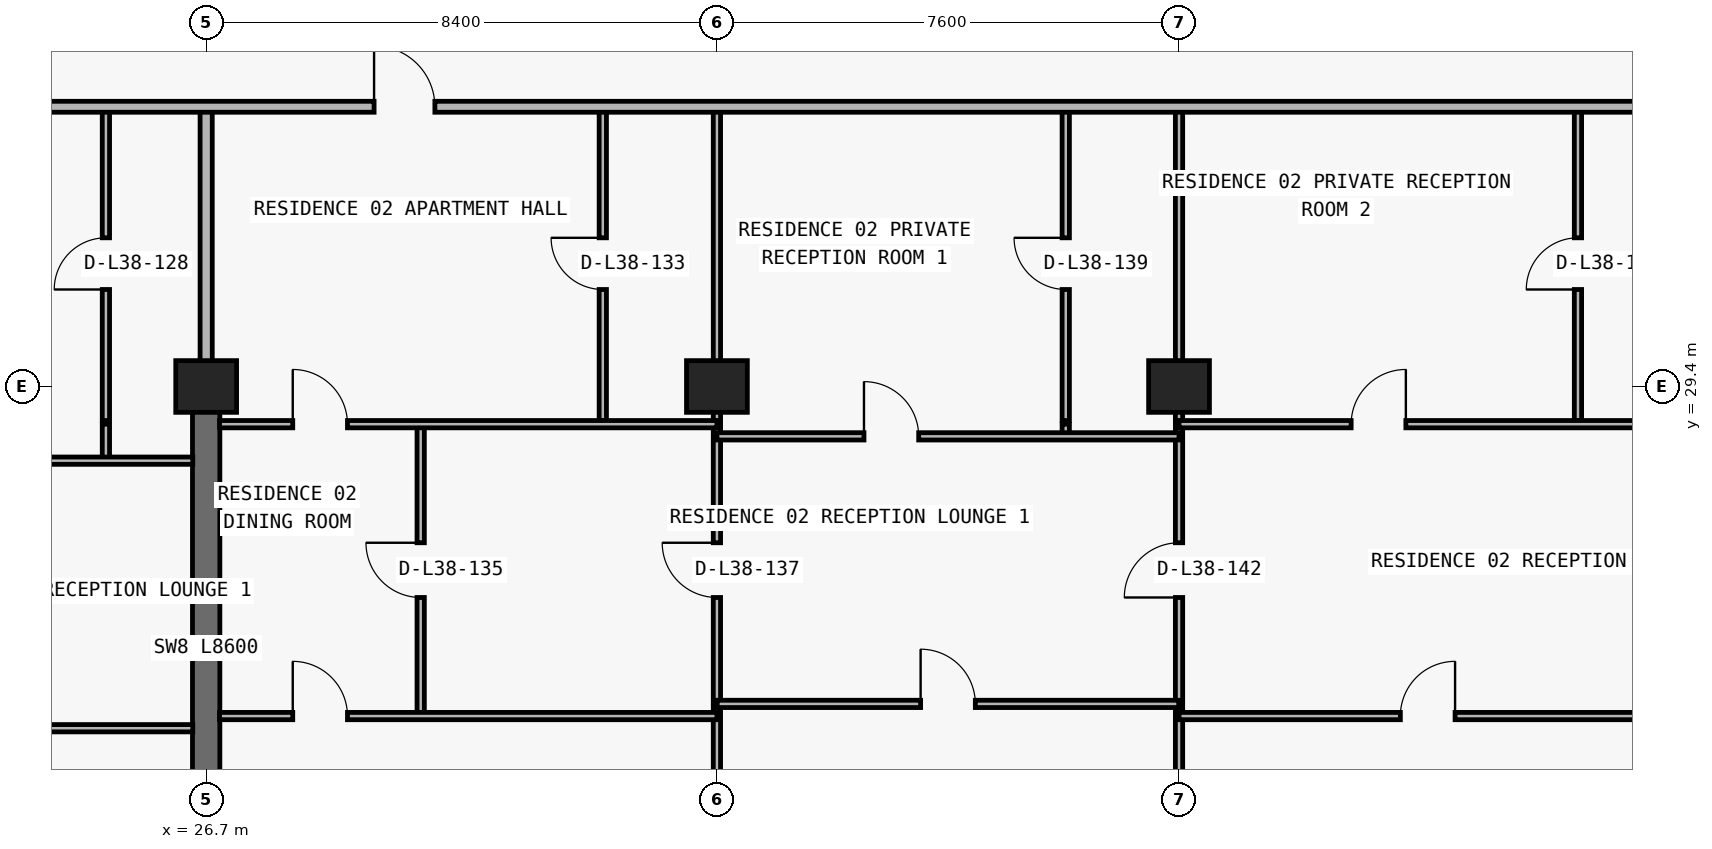
"""IFC4 building model, lengths in metres.
Left out: names, types, materials, properties, quantities, classifications, styles, units other than length and angle.
Written with IfcOpenShell. Run it as: python <this file> out.ifc"""

import sys

from ifc_helpers import new_model, si_unit, direction, frame, frame_2d, origin, origin_2d, place, context, subcontext, project, spatial, rectangle, extrude, element, fill, save


model = new_model("IFC4")
c1 = context("Model", 3, precision=1e-05, world=origin(), true_north=direction((0.0, 1.0)))
c2 = subcontext(c1, "Body", "Model", "MODEL_VIEW")
j1 = project(units=[si_unit("LENGTHUNIT", "METRE"), si_unit("PLANEANGLEUNIT", "RADIAN")], contexts=[c1])
p1 = place(None, origin())
s1 = spatial("IfcSite", under=j1, at=p1, CompositionType="ELEMENT")
p2 = place(p1, origin())
s2 = spatial("IfcBuilding", under=s1, at=p2, CompositionType="ELEMENT")
p3 = place(p2, frame((0.0, 0.0, 138.9)))
s3 = spatial("IfcBuildingStorey", under=s2, at=p3, CompositionType="ELEMENT", Elevation=138.9)
for number, where, z_axis, x_axis in (
    (1, (26.7, 29.4, 0.0), (0.0, 0.0, 1.0), (1.0, 0.0, 0.0)),
    (2, (35.1, 29.4, 0.0), (0.0, 0.0, 1.0), (1.0, 0.0, 0.0)),
    (3, (42.7, 29.4, 0.0), (0.0, 0.0, 1.0), (1.0, 0.0, 0.0)),
):
    element("IfcColumn", number, at=place(p3, frame(where, z_axis=z_axis, x_axis=x_axis)), inside=s3, PredefinedType="COLUMN", context=c2, shape_type="SweptSolid", body=[
        extrude(rectangle(XDim=1.0, YDim=0.85, at=origin_2d()), origin(), (0.0, 0.0, 1.0), 3.05),
    ])
p4 = place(p3, frame((26.7, 20.8, 0.0), z_axis=(0.0, 0.0, 1.0), x_axis=(0.0, 1.0, 0.0)))
e4 = element("IfcWall", 4, at=p4, inside=s3, PredefinedType="SHEAR", context=c2, shape_type="SweptSolid", body=[
    extrude(rectangle(XDim=8.6, YDim=0.45, at=frame_2d((4.3, 0.0))), origin(), (0.0, 0.0, 1.0), 3.05),
])
p5 = place(p3, frame((25.051, 28.18, 0.0), z_axis=(0.0, 0.0, 1.0), x_axis=(0.0, 1.0, 0.0)))
e5 = element("IfcWall", 5, at=p5, inside=s3, PredefinedType="PARTITIONING", context=c2, shape_type="SweptSolid", body=[
    extrude(rectangle(XDim=0.6, YDim=0.12, at=frame_2d((0.3, 0.0))), origin(), (0.0, 0.0, 1.0), 3.05),
])
p6 = place(p3, frame((25.051, 28.84, 0.0), z_axis=(0.0, 0.0, 1.0), x_axis=(0.0, 1.0, 0.0)))
e6 = element("IfcWall", 6, at=p6, inside=s3, PredefinedType="PARTITIONING", context=c2, shape_type="SweptSolid", body=[
    extrude(rectangle(XDim=5.16, YDim=0.12, at=frame_2d((2.58, 0.0))), origin(), (0.0, 0.0, 1.0), 3.05),
])
p7 = place(p6, frame((2.155, 0.0, 0.0)))
e7 = element("IfcOpeningElement", 7, at=p7, cuts=e6, PredefinedType="OPENING", context=c2, shape_type="SweptSolid", body=[
    extrude(rectangle(XDim=0.85, YDim=2.1, at=frame_2d((0.425, 1.05))), frame((0.0, 0.07, 0.0), z_axis=(0.0, -1.0, 0.0), x_axis=(1.0, 0.0, 0.0)), (0.0, 0.0, 1.0), 0.14),
])
p8 = place(p3, frame((26.7, 29.405, 0.0), z_axis=(0.0, 0.0, 1.0), x_axis=(0.0, 1.0, 0.0)))
e8 = element("IfcWall", 8, at=p8, inside=s3, PredefinedType="PARTITIONING", context=c2, shape_type="SweptSolid", body=[
    extrude(rectangle(XDim=4.595, YDim=0.2, at=frame_2d((2.297, 0.0))), origin(), (0.0, 0.0, 1.0), 2.335),
])
p9 = place(p3, frame((30.228, 23.98, 0.0), z_axis=(0.0, 0.0, 1.0), x_axis=(0.0, 1.0, 0.0)))
e9 = element("IfcWall", 9, at=p9, inside=s3, PredefinedType="PARTITIONING", context=c2, shape_type="SweptSolid", body=[
    extrude(rectangle(XDim=4.8, YDim=0.12, at=frame_2d((2.4, 0.0))), origin(), (0.0, 0.0, 1.0), 3.05),
])
p10 = place(p9, frame((1.95, 0.0, 0.0)))
e10 = element("IfcOpeningElement", 10, at=p10, cuts=e9, PredefinedType="OPENING", context=c2, shape_type="SweptSolid", body=[
    extrude(rectangle(XDim=0.9, YDim=2.15, at=frame_2d((0.45, 1.075))), frame((0.0, 0.07, 0.0), z_axis=(0.0, -1.0, 0.0), x_axis=(1.0, 0.0, 0.0)), (0.0, 0.0, 1.0), 0.14),
])
p11 = place(p3, frame((33.223, 28.84, 0.0), z_axis=(0.0, 0.0, 1.0), x_axis=(0.0, 1.0, 0.0)))
e11 = element("IfcWall", 11, at=p11, inside=s3, PredefinedType="PARTITIONING", context=c2, shape_type="SweptSolid", body=[
    extrude(rectangle(XDim=5.16, YDim=0.12, at=frame_2d((2.58, 0.0))), origin(), (0.0, 0.0, 1.0), 3.05),
])
p12 = place(p11, frame((2.155, 0.0, 0.0)))
e12 = element("IfcOpeningElement", 12, at=p12, cuts=e11, PredefinedType="OPENING", context=c2, shape_type="SweptSolid", body=[
    extrude(rectangle(XDim=0.85, YDim=2.1, at=frame_2d((0.425, 1.05))), frame((0.0, 0.07, 0.0), z_axis=(0.0, -1.0, 0.0), x_axis=(1.0, 0.0, 0.0)), (0.0, 0.0, 1.0), 0.14),
])
p13 = place(p3, frame((35.1, 8.84, 0.0), z_axis=(0.0, 0.0, 1.0), x_axis=(0.0, 1.0, 0.0)))
e13 = element("IfcWall", 13, at=p13, inside=s3, PredefinedType="PARTITIONING", context=c2, shape_type="SweptSolid", body=[
    extrude(rectangle(XDim=19.94, YDim=0.12, at=frame_2d((9.97, 0.0))), origin(), (0.0, 0.0, 1.0), 2.174),
])
p14 = place(p13, frame((17.09, 0.0, 0.0)))
e14 = element("IfcOpeningElement", 14, at=p14, cuts=e13, PredefinedType="OPENING", context=c2, shape_type="SweptSolid", body=[
    extrude(rectangle(XDim=0.9, YDim=2.124, at=frame_2d((0.45, 1.062))), frame((0.0, 0.07, 0.0), z_axis=(0.0, -1.0, 0.0), x_axis=(1.0, 0.0, 0.0)), (0.0, 0.0, 1.0), 0.14),
])
p15 = place(p3, frame((35.1, 28.84, 0.0), z_axis=(0.0, 0.0, 1.0), x_axis=(0.0, 1.0, 0.0)))
e15 = element("IfcWall", 15, at=p15, inside=s3, PredefinedType="PARTITIONING", context=c2, shape_type="SweptSolid", body=[
    extrude(rectangle(XDim=5.16, YDim=0.12, at=frame_2d((2.58, 0.0))), origin(), (0.0, 0.0, 1.0), 2.174),
])
p16 = place(p3, frame((40.837, 28.58, 0.0), z_axis=(0.0, 0.0, 1.0), x_axis=(0.0, 1.0, 0.0)))
e16 = element("IfcWall", 16, at=p16, inside=s3, PredefinedType="PARTITIONING", context=c2, shape_type="SweptSolid", body=[
    extrude(rectangle(XDim=0.2, YDim=0.12, at=frame_2d((0.1, 0.0))), origin(), (0.0, 0.0, 1.0), 3.05),
])
p17 = place(p3, frame((40.837, 28.84, 0.0), z_axis=(0.0, 0.0, 1.0), x_axis=(0.0, 1.0, 0.0)))
e17 = element("IfcWall", 17, at=p17, inside=s3, PredefinedType="PARTITIONING", context=c2, shape_type="SweptSolid", body=[
    extrude(rectangle(XDim=5.16, YDim=0.12, at=frame_2d((2.58, 0.0))), origin(), (0.0, 0.0, 1.0), 3.05),
])
p18 = place(p17, frame((2.155, 0.0, 0.0)))
e18 = element("IfcOpeningElement", 18, at=p18, cuts=e17, PredefinedType="OPENING", context=c2, shape_type="SweptSolid", body=[
    extrude(rectangle(XDim=0.85, YDim=2.1, at=frame_2d((0.425, 1.05))), frame((0.0, 0.07, 0.0), z_axis=(0.0, -1.0, 0.0), x_axis=(1.0, 0.0, 0.0)), (0.0, 0.0, 1.0), 0.14),
])
p19 = place(p3, frame((42.7, 8.84, 0.0), z_axis=(0.0, 0.0, 1.0), x_axis=(0.0, 1.0, 0.0)))
e19 = element("IfcWall", 19, at=p19, inside=s3, PredefinedType="PARTITIONING", context=c2, shape_type="SweptSolid", body=[
    extrude(rectangle(XDim=19.94, YDim=0.12, at=frame_2d((9.97, 0.0))), origin(), (0.0, 0.0, 1.0), 2.174),
])
p20 = place(p19, frame((17.09, 0.0, 0.0)))
e20 = element("IfcOpeningElement", 20, at=p20, cuts=e19, PredefinedType="OPENING", context=c2, shape_type="SweptSolid", body=[
    extrude(rectangle(XDim=0.9, YDim=2.124, at=frame_2d((0.45, 1.062))), frame((0.0, 0.07, 0.0), z_axis=(0.0, -1.0, 0.0), x_axis=(1.0, 0.0, 0.0)), (0.0, 0.0, 1.0), 0.14),
])
p21 = place(p3, frame((42.7, 28.84, 0.0), z_axis=(0.0, 0.0, 1.0), x_axis=(0.0, 1.0, 0.0)))
e21 = element("IfcWall", 21, at=p21, inside=s3, PredefinedType="PARTITIONING", context=c2, shape_type="SweptSolid", body=[
    extrude(rectangle(XDim=5.16, YDim=0.12, at=frame_2d((2.58, 0.0))), origin(), (0.0, 0.0, 1.0), 2.174),
])
p22 = place(p3, frame((49.261, 28.84, 0.0), z_axis=(0.0, 0.0, 1.0), x_axis=(0.0, 1.0, 0.0)))
e22 = element("IfcWall", 22, at=p22, inside=s3, PredefinedType="PARTITIONING", context=c2, shape_type="SweptSolid", body=[
    extrude(rectangle(XDim=5.16, YDim=0.12, at=frame_2d((2.58, 0.0))), origin(), (0.0, 0.0, 1.0), 3.05),
])
p23 = place(p22, frame((2.155, 0.0, 0.0)))
e23 = element("IfcOpeningElement", 23, at=p23, cuts=e22, PredefinedType="OPENING", context=c2, shape_type="SweptSolid", body=[
    extrude(rectangle(XDim=0.85, YDim=2.1, at=frame_2d((0.425, 1.05))), frame((0.0, 0.07, 0.0), z_axis=(0.0, -1.0, 0.0), x_axis=(1.0, 0.0, 0.0)), (0.0, 0.0, 1.0), 0.14),
])
p24 = place(p3, frame((18.3, 23.78, 0.0), z_axis=(0.0, 0.0, 1.0), x_axis=(1.0, 0.0, 0.0)))
e24 = element("IfcWall", 24, at=p24, inside=s3, PredefinedType="PARTITIONING", context=c2, shape_type="SweptSolid", body=[
    extrude(rectangle(XDim=8.18, YDim=0.12, at=frame_2d((4.09, 0.0))), origin(), (0.0, 0.0, 1.0), 3.05),
])
p25 = place(p24, frame((3.64, 0.0, 0.0)))
e25 = element("IfcOpeningElement", 25, at=p25, cuts=e24, PredefinedType="OPENING", context=c2, shape_type="SweptSolid", body=[
    extrude(rectangle(XDim=0.9, YDim=2.15, at=frame_2d((0.45, 1.075))), frame((0.0, 0.07, 0.0), z_axis=(0.0, -1.0, 0.0), x_axis=(1.0, 0.0, 0.0)), (0.0, 0.0, 1.0), 0.14),
])
p26 = place(p3, frame((26.92, 23.98, 0.0), z_axis=(0.0, 0.0, 1.0), x_axis=(1.0, 0.0, 0.0)))
e26 = element("IfcWall", 26, at=p26, inside=s3, PredefinedType="PARTITIONING", context=c2, shape_type="SweptSolid", body=[
    extrude(rectangle(XDim=8.18, YDim=0.12, at=frame_2d((4.09, 0.0))), origin(), (0.0, 0.0, 1.0), 3.05),
])
p27 = place(p26, frame((1.204, 0.0, 0.0)))
e27 = element("IfcOpeningElement", 27, at=p27, cuts=e26, PredefinedType="OPENING", context=c2, shape_type="SweptSolid", body=[
    extrude(rectangle(XDim=0.9, YDim=2.15, at=frame_2d((0.45, 1.075))), frame((0.0, 0.07, 0.0), z_axis=(0.0, -1.0, 0.0), x_axis=(1.0, 0.0, 0.0)), (0.0, 0.0, 1.0), 0.14),
])
p28 = place(p3, frame((42.7, 23.98, 0.0), z_axis=(0.0, 0.0, 1.0), x_axis=(1.0, 0.0, 0.0)))
e28 = element("IfcWall", 28, at=p28, inside=s3, PredefinedType="PARTITIONING", context=c2, shape_type="SweptSolid", body=[
    extrude(rectangle(XDim=8.18, YDim=0.12, at=frame_2d((4.09, 0.0))), origin(), (0.0, 0.0, 1.0), 3.05),
])
p29 = place(p28, frame((3.64, 0.0, 0.0)))
e29 = element("IfcOpeningElement", 29, at=p29, cuts=e28, PredefinedType="OPENING", context=c2, shape_type="SweptSolid", body=[
    extrude(rectangle(XDim=0.9, YDim=2.15, at=frame_2d((0.45, 1.075))), frame((0.0, 0.07, 0.0), z_axis=(0.0, -1.0, 0.0), x_axis=(1.0, 0.0, 0.0)), (0.0, 0.0, 1.0), 0.14),
])
p30 = place(p3, frame((35.105, 24.18, 0.0), z_axis=(0.0, 0.0, 1.0), x_axis=(1.0, 0.0, 0.0)))
e30 = element("IfcWall", 30, at=p30, inside=s3, PredefinedType="PARTITIONING", context=c2, shape_type="SweptSolid", body=[
    extrude(rectangle(XDim=7.59, YDim=0.12, at=frame_2d((3.795, 0.0))), origin(), (0.0, 0.0, 1.0), 3.05),
])
p31 = place(p30, frame((3.345, 0.0, 0.0)))
e31 = element("IfcOpeningElement", 31, at=p31, cuts=e30, PredefinedType="OPENING", context=c2, shape_type="SweptSolid", body=[
    extrude(rectangle(XDim=0.9, YDim=2.15, at=frame_2d((0.45, 1.075))), frame((0.0, 0.07, 0.0), z_axis=(0.0, -1.0, 0.0), x_axis=(1.0, 0.0, 0.0)), (0.0, 0.0, 1.0), 0.14),
])
p32 = place(p3, frame((18.3, 28.18, 0.0), z_axis=(0.0, 0.0, 1.0), x_axis=(1.0, 0.0, 0.0)))
e32 = element("IfcWall", 32, at=p32, inside=s3, PredefinedType="PARTITIONING", context=c2, shape_type="SweptSolid", body=[
    extrude(rectangle(XDim=8.18, YDim=0.12, at=frame_2d((4.09, 0.0))), origin(), (0.0, 0.0, 1.0), 3.05),
])
p33 = place(p32, frame((2.926, 0.0, 0.0)))
e33 = element("IfcOpeningElement", 33, at=p33, cuts=e32, PredefinedType="OPENING", context=c2, shape_type="SweptSolid", body=[
    extrude(rectangle(XDim=0.9, YDim=2.15, at=frame_2d((0.45, 1.075))), frame((0.0, 0.07, 0.0), z_axis=(0.0, -1.0, 0.0), x_axis=(1.0, 0.0, 0.0)), (0.0, 0.0, 1.0), 0.14),
])
p34 = place(p3, frame((35.1, 28.58, 0.0), z_axis=(0.0, 0.0, 1.0), x_axis=(1.0, 0.0, 0.0)))
e34 = element("IfcWall", 34, at=p34, inside=s3, PredefinedType="PARTITIONING", context=c2, shape_type="SweptSolid", body=[
    extrude(rectangle(XDim=7.6, YDim=0.12, at=frame_2d((3.8, 0.0))), origin(), (0.0, 0.0, 1.0), 3.05),
])
p35 = place(p34, frame((2.418, 0.0, 0.0)))
e35 = element("IfcOpeningElement", 35, at=p35, cuts=e34, PredefinedType="OPENING", context=c2, shape_type="SweptSolid", body=[
    extrude(rectangle(XDim=0.9, YDim=2.15, at=frame_2d((0.45, 1.075))), frame((0.0, 0.07, 0.0), z_axis=(0.0, -1.0, 0.0), x_axis=(1.0, 0.0, 0.0)), (0.0, 0.0, 1.0), 0.14),
])
p36 = place(p3, frame((26.92, 28.78, 0.0), z_axis=(0.0, 0.0, 1.0), x_axis=(1.0, 0.0, 0.0)))
e36 = element("IfcWall", 36, at=p36, inside=s3, PredefinedType="PARTITIONING", context=c2, shape_type="SweptSolid", body=[
    extrude(rectangle(XDim=8.18, YDim=0.12, at=frame_2d((4.09, 0.0))), origin(), (0.0, 0.0, 1.0), 3.05),
])
p37 = place(p36, frame((1.204, 0.0, 0.0)))
e37 = element("IfcOpeningElement", 37, at=p37, cuts=e36, PredefinedType="OPENING", context=c2, shape_type="SweptSolid", body=[
    extrude(rectangle(XDim=0.9, YDim=2.15, at=frame_2d((0.45, 1.075))), frame((0.0, 0.07, 0.0), z_axis=(0.0, -1.0, 0.0), x_axis=(1.0, 0.0, 0.0)), (0.0, 0.0, 1.0), 0.14),
])
p38 = place(p3, frame((42.7, 28.78, 0.0), z_axis=(0.0, 0.0, 1.0), x_axis=(1.0, 0.0, 0.0)))
e38 = element("IfcWall", 38, at=p38, inside=s3, PredefinedType="PARTITIONING", context=c2, shape_type="SweptSolid", body=[
    extrude(rectangle(XDim=8.18, YDim=0.12, at=frame_2d((4.09, 0.0))), origin(), (0.0, 0.0, 1.0), 3.05),
])
p39 = place(p38, frame((2.831, 0.0, 0.0)))
e39 = element("IfcOpeningElement", 39, at=p39, cuts=e38, PredefinedType="OPENING", context=c2, shape_type="SweptSolid", body=[
    extrude(rectangle(XDim=0.9, YDim=2.15, at=frame_2d((0.45, 1.075))), frame((0.0, 0.07, 0.0), z_axis=(0.0, -1.0, 0.0), x_axis=(1.0, 0.0, 0.0)), (0.0, 0.0, 1.0), 0.14),
])
p40 = place(p3, frame((18.3, 34.0, 0.0), z_axis=(0.0, 0.0, 1.0), x_axis=(1.0, 0.0, 0.0)))
e40 = element("IfcWall", 40, at=p40, inside=s3, PredefinedType="PARTITIONING", context=c2, shape_type="SweptSolid", body=[
    extrude(rectangle(XDim=37.586, YDim=0.18, at=frame_2d((18.793, 0.0))), origin(), (0.0, 0.0, 1.0), 3.05),
])
p41 = place(p40, frame((11.162, 0.0, 0.0)))
e41 = element("IfcOpeningElement", 41, at=p41, cuts=e40, PredefinedType="OPENING", context=c2, shape_type="SweptSolid", body=[
    extrude(rectangle(XDim=1.0, YDim=2.2, at=frame_2d((0.5, 1.1))), frame((0.0, 0.1, 0.0), z_axis=(0.0, -1.0, 0.0), x_axis=(1.0, 0.0, 0.0)), (0.0, 0.0, 1.0), 0.2),
])
p42 = place(p40, frame((34.693, 0.0, 0.0)))
e42 = element("IfcOpeningElement", 42, at=p42, cuts=e40, PredefinedType="OPENING", context=c2, shape_type="SweptSolid", body=[
    extrude(rectangle(XDim=1.0, YDim=2.2, at=frame_2d((0.5, 1.1))), frame((0.0, 0.1, 0.0), z_axis=(0.0, -1.0, 0.0), x_axis=(1.0, 0.0, 0.0)), (0.0, 0.0, 1.0), 0.2),
])
p43 = place(p7, origin())
e43 = element("IfcDoor", 43, at=p43, inside=s3, OperationType="SINGLE_SWING_LEFT", PredefinedType="DOOR", context=c2, shape_type="SweptSolid", body=[
    extrude(rectangle(XDim=0.85, YDim=2.1, at=frame_2d((0.425, 1.05))), frame((0.0, 0.025, 0.0), z_axis=(0.0, -1.0, 0.0), x_axis=(1.0, 0.0, 0.0)), (0.0, 0.0, 1.0), 0.05),
])
fill(e7, e43)
p44 = place(p41, origin())
e44 = element("IfcDoor", 44, at=p44, inside=s3, OperationType="SINGLE_SWING_LEFT", PredefinedType="DOOR", context=c2, shape_type="SweptSolid", body=[
    extrude(rectangle(XDim=1.0, YDim=2.2, at=frame_2d((0.5, 1.1))), frame((0.0, 0.025, 0.0), z_axis=(0.0, -1.0, 0.0), x_axis=(1.0, 0.0, 0.0)), (0.0, 0.0, 1.0), 0.05),
])
fill(e41, e44)
p45 = place(p12, origin())
e45 = element("IfcDoor", 45, at=p45, inside=s3, OperationType="SINGLE_SWING_RIGHT", PredefinedType="DOOR", context=c2, shape_type="SweptSolid", body=[
    extrude(rectangle(XDim=0.85, YDim=2.1, at=frame_2d((0.425, 1.05))), frame((0.0, 0.025, 0.0), z_axis=(0.0, -1.0, 0.0), x_axis=(1.0, 0.0, 0.0)), (0.0, 0.0, 1.0), 0.05),
])
fill(e12, e45)
p46 = place(p37, origin())
e46 = element("IfcDoor", 46, at=p46, inside=s3, OperationType="SINGLE_SWING_LEFT", PredefinedType="DOOR", context=c2, shape_type="SweptSolid", body=[
    extrude(rectangle(XDim=0.9, YDim=2.15, at=frame_2d((0.45, 1.075))), frame((0.0, 0.025, 0.0), z_axis=(0.0, -1.0, 0.0), x_axis=(1.0, 0.0, 0.0)), (0.0, 0.0, 1.0), 0.05),
])
fill(e37, e46)
p47 = place(p10, origin())
e47 = element("IfcDoor", 47, at=p47, inside=s3, OperationType="SINGLE_SWING_RIGHT", PredefinedType="DOOR", context=c2, shape_type="SweptSolid", body=[
    extrude(rectangle(XDim=0.9, YDim=2.15, at=frame_2d((0.45, 1.075))), frame((0.0, 0.025, 0.0), z_axis=(0.0, -1.0, 0.0), x_axis=(1.0, 0.0, 0.0)), (0.0, 0.0, 1.0), 0.05),
])
fill(e10, e47)
p48 = place(p27, origin())
e48 = element("IfcDoor", 48, at=p48, inside=s3, OperationType="SINGLE_SWING_LEFT", PredefinedType="DOOR", context=c2, shape_type="SweptSolid", body=[
    extrude(rectangle(XDim=0.9, YDim=2.15, at=frame_2d((0.45, 1.075))), frame((0.0, 0.025, 0.0), z_axis=(0.0, -1.0, 0.0), x_axis=(1.0, 0.0, 0.0)), (0.0, 0.0, 1.0), 0.05),
])
fill(e27, e48)
p49 = place(p14, origin())
e49 = element("IfcDoor", 49, at=p49, inside=s3, OperationType="SINGLE_SWING_RIGHT", PredefinedType="DOOR", context=c2, shape_type="SweptSolid", body=[
    extrude(rectangle(XDim=0.9, YDim=2.124, at=frame_2d((0.45, 1.062))), frame((0.0, 0.025, 0.0), z_axis=(0.0, -1.0, 0.0), x_axis=(1.0, 0.0, 0.0)), (0.0, 0.0, 1.0), 0.05),
])
fill(e14, e49)
p50 = place(p35, origin())
e50 = element("IfcDoor", 50, at=p50, inside=s3, OperationType="SINGLE_SWING_LEFT", PredefinedType="DOOR", context=c2, shape_type="SweptSolid", body=[
    extrude(rectangle(XDim=0.9, YDim=2.15, at=frame_2d((0.45, 1.075))), frame((0.0, 0.025, 0.0), z_axis=(0.0, -1.0, 0.0), x_axis=(1.0, 0.0, 0.0)), (0.0, 0.0, 1.0), 0.05),
])
fill(e35, e50)
p51 = place(p18, origin())
e51 = element("IfcDoor", 51, at=p51, inside=s3, OperationType="SINGLE_SWING_RIGHT", PredefinedType="DOOR", context=c2, shape_type="SweptSolid", body=[
    extrude(rectangle(XDim=0.85, YDim=2.1, at=frame_2d((0.425, 1.05))), frame((0.0, 0.025, 0.0), z_axis=(0.0, -1.0, 0.0), x_axis=(1.0, 0.0, 0.0)), (0.0, 0.0, 1.0), 0.05),
])
fill(e18, e51)
p52 = place(p31, origin())
e52 = element("IfcDoor", 52, at=p52, inside=s3, OperationType="SINGLE_SWING_LEFT", PredefinedType="DOOR", context=c2, shape_type="SweptSolid", body=[
    extrude(rectangle(XDim=0.9, YDim=2.15, at=frame_2d((0.45, 1.075))), frame((0.0, 0.025, 0.0), z_axis=(0.0, -1.0, 0.0), x_axis=(1.0, 0.0, 0.0)), (0.0, 0.0, 1.0), 0.05),
])
fill(e31, e52)
p53 = place(p20, origin())
e53 = element("IfcDoor", 53, at=p53, inside=s3, OperationType="SINGLE_SWING_LEFT", PredefinedType="DOOR", context=c2, shape_type="SweptSolid", body=[
    extrude(rectangle(XDim=0.9, YDim=2.124, at=frame_2d((0.45, 1.062))), frame((0.0, 0.025, 0.0), z_axis=(0.0, -1.0, 0.0), x_axis=(1.0, 0.0, 0.0)), (0.0, 0.0, 1.0), 0.05),
])
fill(e20, e53)
p54 = place(p39, origin())
e54 = element("IfcDoor", 54, at=p54, inside=s3, OperationType="SINGLE_SWING_RIGHT", PredefinedType="DOOR", context=c2, shape_type="SweptSolid", body=[
    extrude(rectangle(XDim=0.9, YDim=2.15, at=frame_2d((0.45, 1.075))), frame((0.0, 0.025, 0.0), z_axis=(0.0, -1.0, 0.0), x_axis=(1.0, 0.0, 0.0)), (0.0, 0.0, 1.0), 0.05),
])
fill(e39, e54)
p55 = place(p23, origin())
e55 = element("IfcDoor", 55, at=p55, inside=s3, OperationType="SINGLE_SWING_LEFT", PredefinedType="DOOR", context=c2, shape_type="SweptSolid", body=[
    extrude(rectangle(XDim=0.85, YDim=2.1, at=frame_2d((0.425, 1.05))), frame((0.0, 0.025, 0.0), z_axis=(0.0, -1.0, 0.0), x_axis=(1.0, 0.0, 0.0)), (0.0, 0.0, 1.0), 0.05),
])
fill(e23, e55)
p56 = place(p29, origin())
e56 = element("IfcDoor", 56, at=p56, inside=s3, OperationType="SINGLE_SWING_RIGHT", PredefinedType="DOOR", context=c2, shape_type="SweptSolid", body=[
    extrude(rectangle(XDim=0.9, YDim=2.15, at=frame_2d((0.45, 1.075))), frame((0.0, 0.025, 0.0), z_axis=(0.0, -1.0, 0.0), x_axis=(1.0, 0.0, 0.0)), (0.0, 0.0, 1.0), 0.05),
])
fill(e29, e56)
save(model, sys.argv[1])
